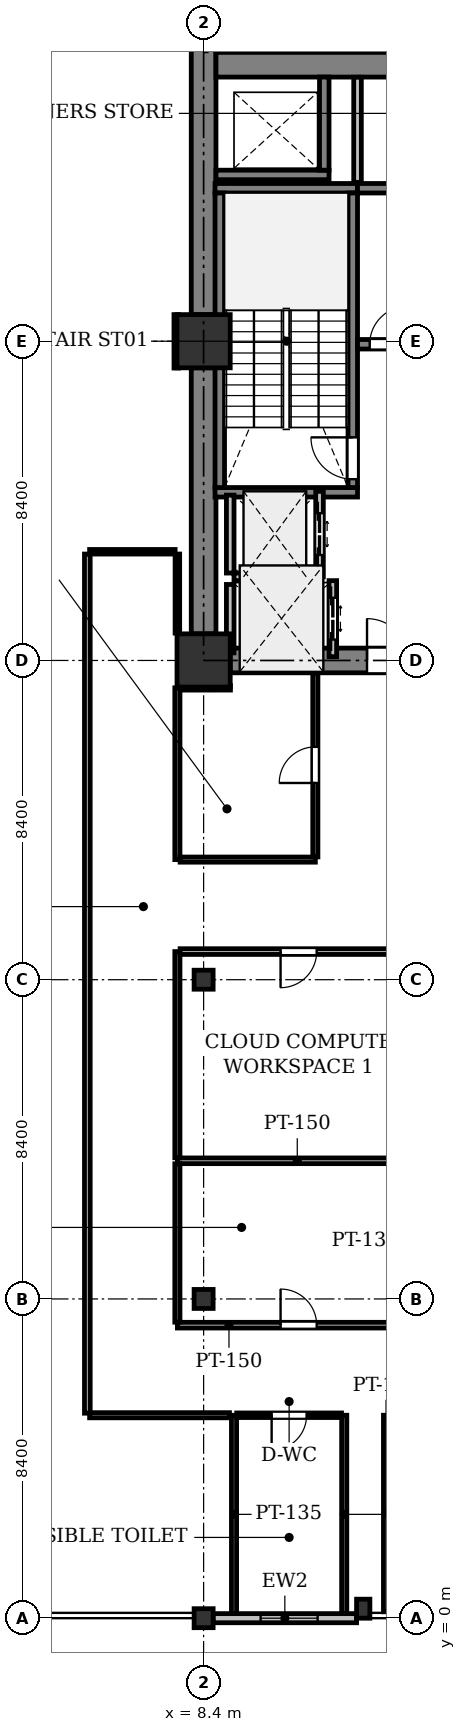
"""IFC4 building model, lengths in metres.
Left out: names, types, materials, properties, quantities, classifications, styles, units other than length and angle.
Written with IfcOpenShell. Run it as: python <this file> out.ifc"""

import sys

from ifc_helpers import new_model, si_unit, direction, frame, frame_2d, origin, origin_2d, place, context, subcontext, project, spatial, rectangle, i_section, extrude, element, fill, save


model = new_model("IFC4")
c1 = context("Model", 3, precision=1e-05, world=origin(), true_north=direction((0.0, 1.0)))
c2 = subcontext(c1, "Body", "Model", "MODEL_VIEW")
j1 = project(units=[si_unit("LENGTHUNIT", "METRE"), si_unit("PLANEANGLEUNIT", "RADIAN")], contexts=[c1])
p1 = place(None, origin())
s1 = spatial("IfcSite", under=j1, at=p1, CompositionType="ELEMENT")
p2 = place(p1, origin())
s2 = spatial("IfcBuilding", under=s1, at=p2, CompositionType="ELEMENT")
p3 = place(p2, frame((0.0, 0.0, 71.0)))
s3 = spatial("IfcBuildingStorey", under=s2, at=p3, CompositionType="ELEMENT", Elevation=71.0)
for number, where, z_axis, x_axis in (
    (1, (8.4, 0.0, 0.0), (0.0, 0.0, 1.0), (1.0, 0.0, 0.0)),
    (2, (8.4, 8.4, 0.0), (0.0, 0.0, 1.0), (1.0, 0.0, 0.0)),
    (3, (8.4, 16.8, 0.0), (0.0, 0.0, 1.0), (1.0, 0.0, 0.0)),
):
    element("IfcColumn", number, at=place(p3, frame(where, z_axis=z_axis, x_axis=x_axis)), inside=s3, PredefinedType="COLUMN", context=c2, shape_type="SweptSolid", body=[
        extrude(i_section(OverallWidth=0.5, OverallDepth=0.5, WebThickness=0.028, FlangeThickness=0.04, at=origin_2d()), origin(), (0.0, 0.0, 1.0), 4.2),
    ])
for number, where, z_axis, x_axis in (
    (4, (8.4, 25.2, 0.0), (0.0, 0.0, 1.0), (1.0, 0.0, 0.0)),
    (5, (8.4, 33.6, 0.0), (0.0, 0.0, 1.0), (1.0, 0.0, 0.0)),
):
    element("IfcColumn", number, at=place(p3, frame(where, z_axis=z_axis, x_axis=x_axis)), inside=s3, PredefinedType="COLUMN", context=c2, shape_type="SweptSolid", body=[
        extrude(rectangle(XDim=1.4, YDim=1.4, at=origin_2d()), origin(), (0.0, 0.0, 1.0), 4.2),
    ])
p4 = place(p3, frame((12.6, 0.25, 0.0), z_axis=(0.0, 0.0, 1.0), x_axis=(1.0, 0.0, 0.0)))
e6 = element("IfcColumn", 6, at=p4, inside=s3, PredefinedType="PILASTER", context=c2, shape_type="SweptSolid", body=[
    extrude(rectangle(XDim=0.35, YDim=0.5, at=origin_2d()), origin(), (0.0, 0.0, 1.0), 4.2),
])
p5 = place(p3, frame((12.425, 0.0, 0.0), z_axis=(0.0, 0.0, 1.0), x_axis=(-1.0, 0.0, 0.0)))
e7 = element("IfcWall", 7, at=p5, inside=s3, PredefinedType="STANDARD", context=c2, shape_type="SweptSolid", body=[
    extrude(rectangle(XDim=3.775, YDim=0.24, at=frame_2d((1.888, 0.0))), origin(), (0.0, 0.0, 1.0), 3.471),
])
p6 = place(p5, frame((1.025, 0.0, 0.9)))
e8 = element("IfcOpeningElement", 8, at=p6, cuts=e7, PredefinedType="OPENING", context=c2, shape_type="SweptSolid", body=[
    extrude(rectangle(XDim=1.5, YDim=1.6, at=frame_2d((0.75, 0.8))), frame((0.0, 0.13, 0.0), z_axis=(0.0, -1.0, 0.0), x_axis=(1.0, 0.0, 0.0)), (0.0, 0.0, 1.0), 0.26),
])
for number, where, z_axis, x_axis in (
    (9, (8.4, 25.9, 0.0), (0.0, 0.0, 1.0), (0.0, 1.0, 0.0)),
    (10, (8.4, 34.3, 0.0), (0.0, 0.0, 1.0), (0.0, 1.0, 0.0)),
):
    element("IfcWall", number, at=place(p3, frame(where, z_axis=z_axis, x_axis=x_axis)), inside=s3, PredefinedType="SHEAR", context=c2, shape_type="SweptSolid", body=[
        extrude(rectangle(XDim=7.0, YDim=0.65, at=frame_2d((3.5, 0.0))), origin(), (0.0, 0.0, 1.0), 3.925),
    ])
p7 = place(p3, frame((8.725, 40.875, 0.0), z_axis=(0.0, 0.0, 1.0), x_axis=(1.0, 0.0, 0.0)))
e11 = element("IfcWall", 11, at=p7, inside=s3, PredefinedType="SHEAR", context=c2, shape_type="SweptSolid", body=[
    extrude(rectangle(XDim=7.75, YDim=0.65, at=frame_2d((3.875, 0.0))), origin(), (0.0, 0.0, 1.0), 3.925),
])
p8 = place(p3, frame((9.1, 25.2, 0.0), z_axis=(0.0, 0.0, 1.0), x_axis=(1.0, 0.0, 0.0)))
e12 = element("IfcWall", 12, at=p8, inside=s3, PredefinedType="SHEAR", context=c2, shape_type="SweptSolid", body=[
    extrude(rectangle(XDim=7.0, YDim=0.65, at=frame_2d((3.5, 0.0))), origin(), (0.0, 0.0, 1.0), 3.925),
])
p9 = place(p8, frame((3.6, 0.0, 0.0)))
e13 = element("IfcOpeningElement", 13, at=p9, cuts=e12, PredefinedType="OPENING", context=c2, shape_type="SweptSolid", body=[
    extrude(rectangle(XDim=1.1, YDim=2.15, at=frame_2d((0.55, 1.075))), frame((0.0, 0.335, 0.0), z_axis=(0.0, -1.0, 0.0), x_axis=(1.0, 0.0, 0.0)), (0.0, 0.0, 1.0), 0.67),
])
for number, where, z_axis, x_axis in (
    (14, (12.45, 29.625, 0.0), (0.0, 0.0, 1.0), (-1.0, 0.0, 0.0)),
    (15, (12.45, 37.625, 0.0), (0.0, 0.0, 1.0), (-1.0, 0.0, 0.0)),
):
    element("IfcWall", number, at=place(p3, frame(where, z_axis=z_axis, x_axis=x_axis)), inside=s3, PredefinedType="SHEAR", context=c2, shape_type="SweptSolid", body=[
        extrude(rectangle(XDim=3.75, YDim=0.25, at=frame_2d((1.875, 0.0))), origin(), (0.0, 0.0, 1.0), 3.925),
    ])
p10 = place(p3, frame((12.325, 29.75, 0.0), z_axis=(0.0, 0.0, 1.0), x_axis=(0.0, 1.0, 0.0)))
e16 = element("IfcWall", 16, at=p10, inside=s3, PredefinedType="SHEAR", context=c2, shape_type="SweptSolid", body=[
    extrude(rectangle(XDim=7.75, YDim=0.25, at=frame_2d((3.875, 0.0))), origin(), (0.0, 0.0, 1.0), 3.925),
])
p11 = place(p10, frame((0.22, 0.0, 0.0)))
e17 = element("IfcOpeningElement", 17, at=p11, cuts=e16, PredefinedType="OPENING", context=c2, shape_type="SweptSolid", body=[
    extrude(rectangle(XDim=1.1, YDim=2.15, at=frame_2d((0.55, 1.075))), frame((0.0, 0.135, 0.0), z_axis=(0.0, -1.0, 0.0), x_axis=(1.0, 0.0, 0.0)), (0.0, 0.0, 1.0), 0.27),
])
p12 = place(p3, frame((8.825, 29.75, 0.0), z_axis=(0.0, 0.0, 1.0), x_axis=(0.0, 1.0, 0.0)))
e18 = element("IfcWall", 18, at=p12, inside=s3, PredefinedType="SHEAR", context=c2, shape_type="SweptSolid", body=[
    extrude(rectangle(XDim=7.75, YDim=0.25, at=frame_2d((3.875, 0.0))), origin(), (0.0, 0.0, 1.0), 3.925),
])
p13 = place(p3, frame((8.725, 37.975, 0.0), z_axis=(0.0, 0.0, 1.0), x_axis=(1.0, 0.0, 0.0)))
e19 = element("IfcWall", 19, at=p13, inside=s3, PredefinedType="SHEAR", context=c2, shape_type="SweptSolid", body=[
    extrude(rectangle(XDim=2.975, YDim=0.25, at=frame_2d((1.487, 0.0))), origin(), (0.0, 0.0, 1.0), 3.925),
])
p14 = place(p3, frame((11.575, 38.1, 0.0), z_axis=(0.0, 0.0, 1.0), x_axis=(0.0, 1.0, 0.0)))
e20 = element("IfcWall", 20, at=p14, inside=s3, PredefinedType="SHEAR", context=c2, shape_type="SweptSolid", body=[
    extrude(rectangle(XDim=2.45, YDim=0.25, at=frame_2d((1.225, 0.0))), origin(), (0.0, 0.0, 1.0), 3.925),
])
p15 = place(p3, frame((12.45, 33.52, 0.0), z_axis=(0.0, 0.0, 1.0), x_axis=(1.0, 0.0, 0.0)))
e21 = element("IfcWall", 21, at=p15, inside=s3, PredefinedType="SHEAR", context=c2, shape_type="SweptSolid", body=[
    extrude(rectangle(XDim=3.65, YDim=0.25, at=frame_2d((1.825, 0.0))), origin(), (0.0, 0.0, 1.0), 3.925),
])
p16 = place(p15, frame((0.32, 0.0, 0.0)))
e22 = element("IfcOpeningElement", 22, at=p16, cuts=e21, PredefinedType="OPENING", context=c2, shape_type="SweptSolid", body=[
    extrude(rectangle(XDim=1.0, YDim=2.15, at=frame_2d((0.5, 1.075))), frame((0.0, 0.135, 0.0), z_axis=(0.0, -1.0, 0.0), x_axis=(1.0, 0.0, 0.0)), (0.0, 0.0, 1.0), 0.27),
])
p17 = place(p3, frame((12.45, 37.625, 0.0), z_axis=(0.0, 0.0, 1.0), x_axis=(1.0, 0.0, 0.0)))
e23 = element("IfcWall", 23, at=p17, inside=s3, PredefinedType="SHEAR", context=c2, shape_type="SweptSolid", body=[
    extrude(rectangle(XDim=4.025, YDim=0.25, at=frame_2d((2.013, 0.0))), origin(), (0.0, 0.0, 1.0), 3.925),
])
p18 = place(p17, frame((1.587, 0.0, 0.0)))
e24 = element("IfcOpeningElement", 24, at=p18, cuts=e23, PredefinedType="OPENING", context=c2, shape_type="SweptSolid", body=[
    extrude(rectangle(XDim=0.85, YDim=2.15, at=frame_2d((0.425, 1.075))), frame((0.0, 0.135, 0.0), z_axis=(0.0, -1.0, 0.0), x_axis=(1.0, 0.0, 0.0)), (0.0, 0.0, 1.0), 0.27),
])
p19 = place(p3, frame((11.45, 27.4, 0.0), z_axis=(0.0, 0.0, 1.0), x_axis=(0.0, 1.0, 0.0)))
e25 = element("IfcWall", 25, at=p19, inside=s3, PredefinedType="PARTITIONING", context=c2, shape_type="SweptSolid", body=[
    extrude(rectangle(XDim=2.25, YDim=0.2, at=frame_2d((1.125, 0.0))), origin(), (0.0, 0.0, 1.0), 3.925),
])
p20 = place(p19, frame((0.575, 0.0, 0.0)))
e26 = element("IfcOpeningElement", 26, at=p20, cuts=e25, PredefinedType="OPENING", context=c2, shape_type="SweptSolid", body=[
    extrude(rectangle(XDim=1.1, YDim=2.2, at=frame_2d((0.55, 1.1))), frame((0.0, 0.11, 0.0), z_axis=(0.0, -1.0, 0.0), x_axis=(1.0, 0.0, 0.0)), (0.0, 0.0, 1.0), 0.22),
])
p21 = place(p3, frame((9.1, 27.5, 0.0), z_axis=(0.0, 0.0, 1.0), x_axis=(0.0, 1.0, 0.0)))
e27 = element("IfcWall", 27, at=p21, inside=s3, PredefinedType="PARTITIONING", context=c2, shape_type="SweptSolid", body=[
    extrude(rectangle(XDim=2.05, YDim=0.2, at=frame_2d((1.025, 0.0))), origin(), (0.0, 0.0, 1.0), 3.925),
])
p22 = place(p3, frame((9.2, 27.4, 0.0), z_axis=(0.0, 0.0, 1.0), x_axis=(1.0, 0.0, 0.0)))
e28 = element("IfcWall", 28, at=p22, inside=s3, PredefinedType="PARTITIONING", context=c2, shape_type="SweptSolid", body=[
    extrude(rectangle(XDim=2.15, YDim=0.2, at=frame_2d((1.075, 0.0))), origin(), (0.0, 0.0, 1.0), 3.925),
])
p23 = place(p3, frame((11.8, 25.3, 0.0), z_axis=(0.0, 0.0, 1.0), x_axis=(0.0, 1.0, 0.0)))
e29 = element("IfcWall", 29, at=p23, inside=s3, PredefinedType="PARTITIONING", context=c2, shape_type="SweptSolid", body=[
    extrude(rectangle(XDim=2.0, YDim=0.2, at=frame_2d((1.0, 0.0))), origin(), (0.0, 0.0, 1.0), 3.925),
])
p24 = place(p23, frame((0.45, 0.0, 0.0)))
e30 = element("IfcOpeningElement", 30, at=p24, cuts=e29, PredefinedType="OPENING", context=c2, shape_type="SweptSolid", body=[
    extrude(rectangle(XDim=1.1, YDim=2.2, at=frame_2d((0.55, 1.1))), frame((0.0, 0.11, 0.0), z_axis=(0.0, -1.0, 0.0), x_axis=(1.0, 0.0, 0.0)), (0.0, 0.0, 1.0), 0.22),
])
p25 = place(p3, frame((9.1, 25.4, 0.0), z_axis=(0.0, 0.0, 1.0), x_axis=(0.0, 1.0, 0.0)))
e31 = element("IfcWall", 31, at=p25, inside=s3, PredefinedType="PARTITIONING", context=c2, shape_type="SweptSolid", body=[
    extrude(rectangle(XDim=1.8, YDim=0.2, at=frame_2d((0.9, 0.0))), origin(), (0.0, 0.0, 1.0), 3.925),
])
p26 = place(p3, frame((12.45, 40.546, 0.0), z_axis=(0.0, 0.0, 1.0), x_axis=(0.0, -1.0, 0.0)))
e32 = element("IfcWall", 32, at=p26, inside=s3, PredefinedType="PARTITIONING", context=c2, shape_type="SweptSolid", body=[
    extrude(rectangle(XDim=2.766, YDim=0.2, at=frame_2d((1.383, 0.0))), origin(), (0.0, 0.0, 1.0), 2.825),
])
for number, where, z_axis, x_axis in (
    (33, (9.2, 5.34, 0.0), (0.0, 0.0, 1.0), (0.0, -1.0, 0.0)),
    (34, (12.1, 0.124, 0.0), (0.0, 0.0, 1.0), (0.0, 1.0, 0.0)),
):
    element("IfcWall", number, at=place(p3, frame(where, z_axis=z_axis, x_axis=x_axis)), inside=s3, PredefinedType="PARTITIONING", context=c2, shape_type="SweptSolid", body=[
        extrude(rectangle(XDim=5.216, YDim=0.135, at=frame_2d((2.608, 0.0))), origin(), (0.0, 0.0, 1.0), 3.925),
    ])
p27 = place(p3, frame((12.029, 5.34, 0.0), z_axis=(0.0, 0.0, 1.0), x_axis=(-1.0, 0.0, 0.0)))
e35 = element("IfcWall", 35, at=p27, inside=s3, PredefinedType="PARTITIONING", context=c2, shape_type="SweptSolid", body=[
    extrude(rectangle(XDim=2.757, YDim=0.12, at=frame_2d((1.378, 0.0))), origin(), (0.0, 0.0, 1.0), 3.925),
])
p28 = place(p27, frame((0.918, 0.0, 0.0)))
e36 = element("IfcOpeningElement", 36, at=p28, cuts=e35, PredefinedType="OPENING", context=c2, shape_type="SweptSolid", body=[
    extrude(rectangle(XDim=0.92, YDim=2.1, at=frame_2d((0.46, 1.05))), frame((0.0, 0.07, 0.0), z_axis=(0.0, -1.0, 0.0), x_axis=(1.0, 0.0, 0.0)), (0.0, 0.0, 1.0), 0.14),
])
p29 = place(p3, frame((13.2, 5.34, 0.0), z_axis=(0.0, 0.0, 1.0), x_axis=(0.0, -1.0, 0.0)))
e37 = element("IfcWall", 37, at=p29, inside=s3, PredefinedType="PARTITIONING", context=c2, shape_type="SweptSolid", body=[
    extrude(rectangle(XDim=5.171, YDim=0.135, at=frame_2d((2.585, 0.0))), origin(), (0.0, 0.0, 1.0), 3.925),
])
p30 = place(p3, frame((7.71, 7.71, 0.0), z_axis=(0.0, 0.0, 1.0), x_axis=(1.0, 0.0, 0.0)))
e38 = element("IfcWall", 38, at=p30, inside=s3, PredefinedType="PARTITIONING", context=c2, shape_type="SweptSolid", body=[
    extrude(rectangle(XDim=6.38, YDim=0.15, at=frame_2d((3.19, 0.0))), origin(), (0.0, 0.0, 1.0), 3.323),
])
p31 = place(p30, frame((2.715, 0.0, 0.0)))
e39 = element("IfcOpeningElement", 39, at=p31, cuts=e38, PredefinedType="OPENING", context=c2, shape_type="SweptSolid", body=[
    extrude(rectangle(XDim=0.95, YDim=2.15, at=frame_2d((0.475, 1.075))), frame((0.0, 0.085, 0.0), z_axis=(0.0, -1.0, 0.0), x_axis=(1.0, 0.0, 0.0)), (0.0, 0.0, 1.0), 0.17),
])
p32 = place(p3, frame((14.019, 12.035, 0.0), z_axis=(0.0, 0.0, 1.0), x_axis=(-1.0, 0.0, 0.0)))
e40 = element("IfcWall", 40, at=p32, inside=s3, PredefinedType="PARTITIONING", context=c2, shape_type="SweptSolid", body=[
    extrude(rectangle(XDim=6.309, YDim=0.15, at=frame_2d((3.154, 0.0))), origin(), (0.0, 0.0, 1.0), 3.323),
])
p33 = place(p3, frame((7.71, 11.956, 0.0), z_axis=(0.0, 0.0, 1.0), x_axis=(0.0, -1.0, 0.0)))
e41 = element("IfcWall", 41, at=p33, inside=s3, PredefinedType="PARTITIONING", context=c2, shape_type="SweptSolid", body=[
    extrude(rectangle(XDim=4.167, YDim=0.135, at=frame_2d((2.083, 0.0))), origin(), (0.0, 0.0, 1.0), 3.313),
])
p34 = place(p3, frame((7.71, 17.54, 0.0), z_axis=(0.0, 0.0, 1.0), x_axis=(0.0, -1.0, 0.0)))
e42 = element("IfcWall", 42, at=p34, inside=s3, PredefinedType="PARTITIONING", context=c2, shape_type="SweptSolid", body=[
    extrude(rectangle(XDim=5.426, YDim=0.135, at=frame_2d((2.713, 0.0))), origin(), (0.0, 0.0, 1.0), 3.313),
])
p35 = place(p3, frame((14.019, 17.54, 0.0), z_axis=(0.0, 0.0, 1.0), x_axis=(-1.0, 0.0, 0.0)))
e43 = element("IfcWall", 43, at=p35, inside=s3, PredefinedType="PARTITIONING", context=c2, shape_type="SweptSolid", body=[
    extrude(rectangle(XDim=6.237, YDim=0.15, at=frame_2d((3.119, 0.0))), origin(), (0.0, 0.0, 1.0), 3.323),
])
p36 = place(p35, frame((2.644, 0.0, 0.0)))
e44 = element("IfcOpeningElement", 44, at=p36, cuts=e43, PredefinedType="OPENING", context=c2, shape_type="SweptSolid", body=[
    extrude(rectangle(XDim=0.95, YDim=2.15, at=frame_2d((0.475, 1.075))), frame((0.0, 0.085, 0.0), z_axis=(0.0, -1.0, 0.0), x_axis=(1.0, 0.0, 0.0)), (0.0, 0.0, 1.0), 0.17),
])
p37 = place(p3, frame((9.08, 5.34, 0.0), z_axis=(0.0, 0.0, 1.0), x_axis=(-1.0, 0.0, 0.0)))
e45 = element("IfcWall", 45, at=p37, inside=s3, PredefinedType="PARTITIONING", context=c2, shape_type="SweptSolid", body=[
    extrude(rectangle(XDim=3.68, YDim=0.135, at=frame_2d((1.84, 0.0))), origin(), (0.0, 0.0, 1.0), 3.323),
])
p38 = place(p3, frame((5.34, 5.394, 0.0), z_axis=(0.0, 0.0, 1.0), x_axis=(-1.0799836e-05, 0.999999999942, 0.0)))
e46 = element("IfcWall", 46, at=p38, inside=s3, PredefinedType="PARTITIONING", context=c2, shape_type="SweptSolid", body=[
    extrude(rectangle(XDim=22.606, YDim=0.15, at=frame_2d((11.303, 0.0))), origin(), (0.0, 0.0, 1.0), 3.313),
])
p39 = place(p3, frame((5.4, 28.06, 0.0), z_axis=(0.0, 0.0, 1.0), x_axis=(1.0, 0.0, 0.0)))
e47 = element("IfcWall", 47, at=p39, inside=s3, PredefinedType="PARTITIONING", context=c2, shape_type="SweptSolid", body=[
    extrude(rectangle(XDim=2.25, YDim=0.12, at=frame_2d((1.125, 0.0))), origin(), (0.0, 0.0, 1.0), 3.925),
])
p40 = place(p3, frame((7.71, 28.0, 0.0), z_axis=(0.0, 0.0, 1.0), x_axis=(0.0, -1.0, 0.0)))
e48 = element("IfcWall", 48, at=p40, inside=s3, PredefinedType="PARTITIONING", context=c2, shape_type="SweptSolid", body=[
    extrude(rectangle(XDim=2.08, YDim=0.12, at=frame_2d((1.04, 0.0))), origin(), (0.0, 0.0, 1.0), 3.925),
])
p41 = place(p3, frame((7.681, 32.894, 0.0), z_axis=(0.0, 0.0, 1.0), x_axis=(-0.000694685487, 0.999999758706, 0.0)))
e49 = element("IfcWall", 49, at=p41, inside=s3, PredefinedType="PARTITIONING", context=c2, shape_type="SweptSolid", body=[
    extrude(rectangle(XDim=1.406, YDim=0.12, at=frame_2d((0.703, 0.0))), origin(), (0.0, 0.0, 1.0), 3.313),
])
p42 = place(p3, frame((9.106, 24.481, 0.0), z_axis=(0.0, 0.0, 1.0), x_axis=(-0.999999755233, -0.000699667487, 0.0)))
e50 = element("IfcWall", 50, at=p42, inside=s3, PredefinedType="PARTITIONING", context=c2, shape_type="SweptSolid", body=[
    extrude(rectangle(XDim=1.396, YDim=0.12, at=frame_2d((0.698, 0.0))), origin(), (0.0, 0.0, 1.0), 3.323),
])
p43 = place(p3, frame((7.71, 24.48, 0.0), z_axis=(0.0, 0.0, 1.0), x_axis=(0.0, -1.0, 0.0)))
e51 = element("IfcWall", 51, at=p43, inside=s3, PredefinedType="PARTITIONING", context=c2, shape_type="SweptSolid", body=[
    extrude(rectangle(XDim=4.52, YDim=0.135, at=frame_2d((2.26, 0.0))), origin(), (0.0, 0.0, 1.0), 3.925),
])
p44 = place(p3, frame((7.781, 19.96, 0.0), z_axis=(0.0, 0.0, 1.0), x_axis=(1.0, 0.0, 0.0)))
e52 = element("IfcWall", 52, at=p44, inside=s3, PredefinedType="PARTITIONING", context=c2, shape_type="SweptSolid", body=[
    extrude(rectangle(XDim=3.559, YDim=0.135, at=frame_2d((1.779, 0.0))), origin(), (0.0, 0.0, 1.0), 3.323),
])
p45 = place(p3, frame((11.34, 20.031, 0.0), z_axis=(0.0, 0.0, 1.0), x_axis=(0.0, 1.0, 0.0)))
e53 = element("IfcWall", 53, at=p45, inside=s3, PredefinedType="PARTITIONING", context=c2, shape_type="SweptSolid", body=[
    extrude(rectangle(XDim=4.84, YDim=0.135, at=frame_2d((2.42, 0.0))), origin(), (0.0, 0.0, 1.0), 3.925),
])
p46 = place(p45, frame((1.945, 0.0, 0.0)))
e54 = element("IfcOpeningElement", 54, at=p46, cuts=e53, PredefinedType="OPENING", context=c2, shape_type="SweptSolid", body=[
    extrude(rectangle(XDim=0.95, YDim=2.15, at=frame_2d((0.475, 1.075))), frame((0.0, 0.077, 0.0), z_axis=(0.0, -1.0, 0.0), x_axis=(1.0, 0.0, 0.0)), (0.0, 0.0, 1.0), 0.155),
])
p47 = place(p6, origin())
e55 = element("IfcWindow", 55, at=p47, inside=s3, PartitioningType="SINGLE_PANEL", PredefinedType="WINDOW", context=c2, shape_type="SweptSolid", body=[
    extrude(rectangle(XDim=1.5, YDim=1.6, at=frame_2d((0.75, 0.8))), frame((0.0, 0.03, 0.0), z_axis=(0.0, -1.0, 0.0), x_axis=(1.0, 0.0, 0.0)), (0.0, 0.0, 1.0), 0.06),
])
fill(e8, e55)
p48 = place(p9, origin())
e56 = element("IfcDoor", 56, at=p48, inside=s3, OperationType="SINGLE_SWING_LEFT", PredefinedType="DOOR", context=c2, shape_type="SweptSolid", body=[
    extrude(rectangle(XDim=1.1, YDim=2.15, at=frame_2d((0.55, 1.075))), frame((0.0, 0.025, 0.0), z_axis=(0.0, -1.0, 0.0), x_axis=(1.0, 0.0, 0.0)), (0.0, 0.0, 1.0), 0.05),
])
fill(e13, e56)
p49 = place(p11, origin())
e57 = element("IfcDoor", 57, at=p49, inside=s3, OperationType="SINGLE_SWING_RIGHT", PredefinedType="DOOR", context=c2, shape_type="SweptSolid", body=[
    extrude(rectangle(XDim=1.1, YDim=2.15, at=frame_2d((0.55, 1.075))), frame((0.0, 0.025, 0.0), z_axis=(0.0, -1.0, 0.0), x_axis=(1.0, 0.0, 0.0)), (0.0, 0.0, 1.0), 0.05),
])
fill(e17, e57)
p50 = place(p16, origin())
e58 = element("IfcDoor", 58, at=p50, inside=s3, OperationType="SINGLE_SWING_RIGHT", PredefinedType="DOOR", context=c2, shape_type="SweptSolid", body=[
    extrude(rectangle(XDim=1.0, YDim=2.15, at=frame_2d((0.5, 1.075))), frame((0.0, 0.025, 0.0), z_axis=(0.0, -1.0, 0.0), x_axis=(1.0, 0.0, 0.0)), (0.0, 0.0, 1.0), 0.05),
])
fill(e22, e58)
p51 = place(p20, origin())
e59 = element("IfcDoor", 59, at=p51, inside=s3, OperationType="DOUBLE_DOOR_SLIDING", PredefinedType="DOOR", context=c2, shape_type="SweptSolid", body=[
    extrude(rectangle(XDim=1.1, YDim=2.2, at=frame_2d((0.55, 1.1))), frame((0.0, 0.025, 0.0), z_axis=(0.0, -1.0, 0.0), x_axis=(1.0, 0.0, 0.0)), (0.0, 0.0, 1.0), 0.05),
])
fill(e26, e59)
p52 = place(p24, origin())
e60 = element("IfcDoor", 60, at=p52, inside=s3, OperationType="DOUBLE_DOOR_SLIDING", PredefinedType="DOOR", context=c2, shape_type="SweptSolid", body=[
    extrude(rectangle(XDim=1.1, YDim=2.2, at=frame_2d((0.55, 1.1))), frame((0.0, 0.025, 0.0), z_axis=(0.0, -1.0, 0.0), x_axis=(1.0, 0.0, 0.0)), (0.0, 0.0, 1.0), 0.05),
])
fill(e30, e60)
p53 = place(p28, origin())
e61 = element("IfcDoor", 61, at=p53, inside=s3, OperationType="SINGLE_SWING_RIGHT", PredefinedType="DOOR", context=c2, shape_type="SweptSolid", body=[
    extrude(rectangle(XDim=0.92, YDim=2.1, at=frame_2d((0.46, 1.05))), frame((0.0, 0.025, 0.0), z_axis=(0.0, -1.0, 0.0), x_axis=(1.0, 0.0, 0.0)), (0.0, 0.0, 1.0), 0.05),
])
fill(e36, e61)
p54 = place(p31, origin())
e62 = element("IfcDoor", 62, at=p54, inside=s3, OperationType="SINGLE_SWING_LEFT", PredefinedType="DOOR", context=c2, shape_type="SweptSolid", body=[
    extrude(rectangle(XDim=0.95, YDim=2.15, at=frame_2d((0.475, 1.075))), frame((0.0, 0.025, 0.0), z_axis=(0.0, -1.0, 0.0), x_axis=(1.0, 0.0, 0.0)), (0.0, 0.0, 1.0), 0.05),
])
fill(e39, e62)
p55 = place(p36, origin())
e63 = element("IfcDoor", 63, at=p55, inside=s3, OperationType="SINGLE_SWING_RIGHT", PredefinedType="DOOR", context=c2, shape_type="SweptSolid", body=[
    extrude(rectangle(XDim=0.95, YDim=2.15, at=frame_2d((0.475, 1.075))), frame((0.0, 0.025, 0.0), z_axis=(0.0, -1.0, 0.0), x_axis=(1.0, 0.0, 0.0)), (0.0, 0.0, 1.0), 0.05),
])
fill(e44, e63)
p56 = place(p46, origin())
e64 = element("IfcDoor", 64, at=p56, inside=s3, OperationType="SINGLE_SWING_LEFT", PredefinedType="DOOR", context=c2, shape_type="SweptSolid", body=[
    extrude(rectangle(XDim=0.95, YDim=2.15, at=frame_2d((0.475, 1.075))), frame((0.0, 0.025, 0.0), z_axis=(0.0, -1.0, 0.0), x_axis=(1.0, 0.0, 0.0)), (0.0, 0.0, 1.0), 0.05),
])
fill(e54, e64)
save(model, sys.argv[1])
